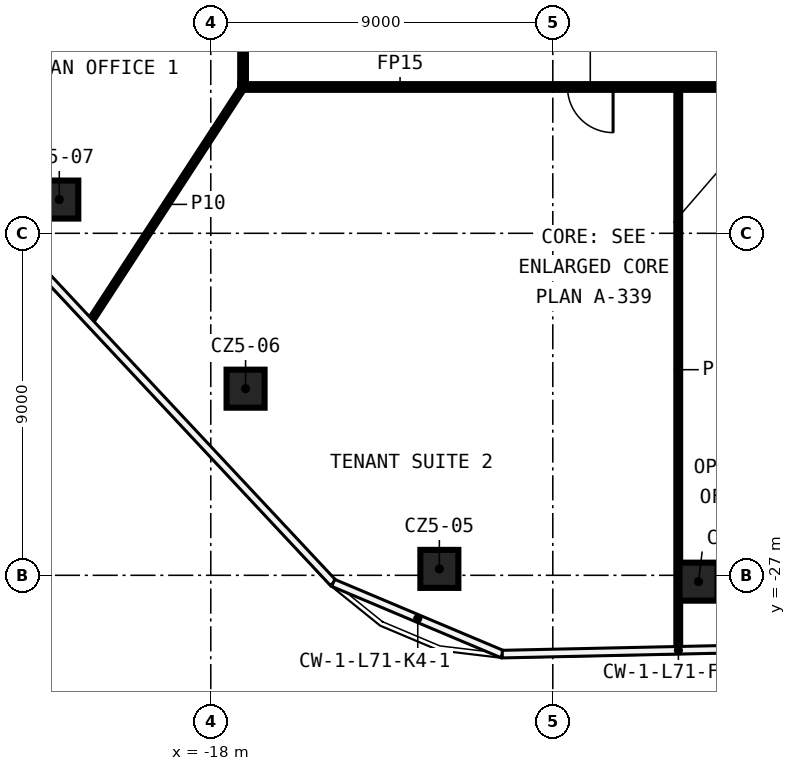
"""IFC4 building model, lengths in metres.
Left out: names, types, materials, properties, quantities, classifications, styles, units other than length and angle.
Written with IfcOpenShell. Run it as: python <this file> out.ifc"""

import sys

from ifc_helpers import new_model, si_unit, direction, frame, frame_2d, origin, origin_2d, place, context, subcontext, project, spatial, rectangle, extrude, element, fill, save


model = new_model("IFC4")
c1 = context("Model", 3, precision=1e-05, world=origin(), true_north=direction((0.0, 1.0)))
c2 = subcontext(c1, "Body", "Model", "MODEL_VIEW")
j1 = project(units=[si_unit("LENGTHUNIT", "METRE"), si_unit("PLANEANGLEUNIT", "RADIAN")], contexts=[c1])
p1 = place(None, origin())
s1 = spatial("IfcSite", under=j1, at=p1, CompositionType="ELEMENT")
p2 = place(p1, origin())
s2 = spatial("IfcBuilding", under=s1, at=p2, CompositionType="ELEMENT")
p3 = place(p2, frame((0.0, 0.0, 332.0)))
s3 = spatial("IfcBuildingStorey", under=s2, at=p3, CompositionType="ELEMENT", Elevation=332.0)
for number, where, z_axis, x_axis in (
    (1, (-5.166, -27.167, 0.0), (0.0, 0.0, 1.0), (1.0, 0.0, 0.0)),
    (2, (-11.985, -26.831, 0.0), (0.0, 0.0, 1.0), (1.0, 0.0, 0.0)),
    (3, (-17.084, -22.089, 0.0), (0.0, 0.0, 1.0), (1.0, 0.0, 0.0)),
    (4, (-21.986, -17.112, 0.0), (0.0, 0.0, 1.0), (1.0, 0.0, 0.0)),
):
    element("IfcColumn", number, at=place(p3, frame(where, z_axis=z_axis, x_axis=x_axis)), inside=s3, PredefinedType="COLUMN", context=c2, shape_type="SweptSolid", body=[
        extrude(rectangle(XDim=1.0, YDim=1.0, at=origin_2d()), origin(), (0.0, 0.0, 1.0), 3.82),
    ])
p4 = place(p3, frame((17.225, -14.15, 0.0), z_axis=(0.0, 0.0, 1.0), x_axis=(-1.0, 0.0, 0.0)))
e5 = element("IfcWall", 5, at=p4, inside=s3, PredefinedType="PARTITIONING", context=c2, shape_type="SweptSolid", body=[
    extrude(rectangle(XDim=34.45, YDim=0.15, at=frame_2d((17.225, 0.0))), origin(), (0.0, 0.0, 1.0), 3.82),
])
p5 = place(p4, frame((24.639, 0.0, 0.0)))
e6 = element("IfcOpeningElement", 6, at=p5, cuts=e5, PredefinedType="OPENING", context=c2, shape_type="SweptSolid", body=[
    extrude(rectangle(XDim=1.2, YDim=2.1, at=frame_2d((0.6, 1.05))), frame((0.0, 0.085, 0.0), z_axis=(0.0, -1.0, 0.0), x_axis=(1.0, 0.0, 0.0)), (0.0, 0.0, 1.0), 0.17),
])
p6 = place(p4, frame((20.005, 0.0, 0.0)))
e7 = element("IfcOpeningElement", 7, at=p6, cuts=e5, PredefinedType="OPENING", context=c2, shape_type="SweptSolid", body=[
    extrude(rectangle(XDim=1.2, YDim=2.1, at=frame_2d((0.6, 1.05))), frame((0.0, 0.085, 0.0), z_axis=(0.0, -1.0, 0.0), x_axis=(1.0, 0.0, 0.0)), (0.0, 0.0, 1.0), 0.17),
])
p7 = place(p4, frame((15.367, 0.0, 0.0)))
e8 = element("IfcOpeningElement", 8, at=p7, cuts=e5, PredefinedType="OPENING", context=c2, shape_type="SweptSolid", body=[
    extrude(rectangle(XDim=1.2, YDim=2.1, at=frame_2d((0.6, 1.05))), frame((0.0, 0.085, 0.0), z_axis=(0.0, -1.0, 0.0), x_axis=(1.0, 0.0, 0.0)), (0.0, 0.0, 1.0), 0.17),
])
p8 = place(p4, frame((10.73, 0.0, 0.0)))
e9 = element("IfcOpeningElement", 9, at=p8, cuts=e5, PredefinedType="OPENING", context=c2, shape_type="SweptSolid", body=[
    extrude(rectangle(XDim=1.2, YDim=2.1, at=frame_2d((0.6, 1.05))), frame((0.0, 0.085, 0.0), z_axis=(0.0, -1.0, 0.0), x_axis=(1.0, 0.0, 0.0)), (0.0, 0.0, 1.0), 0.17),
])
p9 = place(p4, frame((6.097, 0.0, 0.0)))
e10 = element("IfcOpeningElement", 10, at=p9, cuts=e5, PredefinedType="OPENING", context=c2, shape_type="SweptSolid", body=[
    extrude(rectangle(XDim=1.2, YDim=2.1, at=frame_2d((0.6, 1.05))), frame((0.0, 0.085, 0.0), z_axis=(0.0, -1.0, 0.0), x_axis=(1.0, 0.0, 0.0)), (0.0, 0.0, 1.0), 0.17),
])
p10 = place(p4, frame((1.83, 0.0, 0.0)))
e11 = element("IfcOpeningElement", 11, at=p10, cuts=e5, PredefinedType="OPENING", context=c2, shape_type="SweptSolid", body=[
    extrude(rectangle(XDim=1.2, YDim=2.1, at=frame_2d((0.6, 1.05))), frame((0.0, 0.085, 0.0), z_axis=(0.0, -1.0, 0.0), x_axis=(1.0, 0.0, 0.0)), (0.0, 0.0, 1.0), 0.17),
])
p11 = place(p3, frame((-21.176, -20.328, 0.0), z_axis=(0.0, 0.0, 1.0), x_axis=(0.5459597113, 0.837811430834, 0.0)))
e12 = element("IfcWall", 12, at=p11, inside=s3, PredefinedType="PARTITIONING", context=c2, shape_type="SweptSolid", body=[
    extrude(rectangle(XDim=7.374, YDim=0.1, at=frame_2d((3.687, 0.0))), origin(), (0.0, 0.0, 1.0), 3.82),
])
p12 = place(p3, frame((-5.699, -28.953, 0.0), z_axis=(0.0, 0.0, 1.0), x_axis=(0.0, 1.0, 0.0)))
e13 = element("IfcWall", 13, at=p12, inside=s3, PredefinedType="PARTITIONING", context=c2, shape_type="SweptSolid", body=[
    extrude(rectangle(XDim=14.728, YDim=0.1, at=frame_2d((7.364, 0.0))), origin(), (0.0, 0.0, 1.0), 3.82),
])
p13 = place(p3, frame((-17.15, -14.075, 0.0), z_axis=(0.0, 0.0, 1.0), x_axis=(0.0, 1.0, 0.0)))
e14 = element("IfcWall", 14, at=p13, inside=s3, PredefinedType="PARTITIONING", context=c2, shape_type="SweptSolid", body=[
    extrude(rectangle(XDim=28.15, YDim=0.15, at=frame_2d((14.075, 0.0))), origin(), (0.0, 0.0, 1.0), 3.82),
])
p14 = place(p13, frame((11.122, 0.0, 0.0)))
e15 = element("IfcOpeningElement", 15, at=p14, cuts=e14, PredefinedType="OPENING", context=c2, shape_type="SweptSolid", body=[
    extrude(rectangle(XDim=1.2, YDim=2.1, at=frame_2d((0.6, 1.05))), frame((0.0, 0.085, 0.0), z_axis=(0.0, -1.0, 0.0), x_axis=(1.0, 0.0, 0.0)), (0.0, 0.0, 1.0), 0.17),
])
p15 = place(p13, frame((5.555, 0.0, 0.0)))
e16 = element("IfcOpeningElement", 16, at=p15, cuts=e14, PredefinedType="OPENING", context=c2, shape_type="SweptSolid", body=[
    extrude(rectangle(XDim=1.2, YDim=2.1, at=frame_2d((0.6, 1.05))), frame((0.0, 0.085, 0.0), z_axis=(0.0, -1.0, 0.0), x_axis=(1.0, 0.0, 0.0)), (0.0, 0.0, 1.0), 0.17),
])
p16 = place(p13, frame((1.7, 0.0, 0.0)))
e17 = element("IfcOpeningElement", 17, at=p16, cuts=e14, PredefinedType="OPENING", context=c2, shape_type="SweptSolid", body=[
    extrude(rectangle(XDim=1.2, YDim=2.1, at=frame_2d((0.6, 1.05))), frame((0.0, 0.085, 0.0), z_axis=(0.0, -1.0, 0.0), x_axis=(1.0, 0.0, 0.0)), (0.0, 0.0, 1.0), 0.17),
])
p17 = place(p13, frame((24.457, 0.0, 0.0)))
e18 = element("IfcOpeningElement", 18, at=p17, cuts=e14, PredefinedType="OPENING", context=c2, shape_type="SweptSolid", body=[
    extrude(rectangle(XDim=1.2, YDim=2.1, at=frame_2d((0.6, 1.05))), frame((0.0, 0.085, 0.0), z_axis=(0.0, -1.0, 0.0), x_axis=(1.0, 0.0, 0.0)), (0.0, 0.0, 1.0), 0.17),
])
p18 = place(p13, frame((20.314, 0.0, 0.0)))
e19 = element("IfcOpeningElement", 19, at=p18, cuts=e14, PredefinedType="OPENING", context=c2, shape_type="SweptSolid", body=[
    extrude(rectangle(XDim=1.2, YDim=2.1, at=frame_2d((0.6, 1.05))), frame((0.0, 0.085, 0.0), z_axis=(0.0, -1.0, 0.0), x_axis=(1.0, 0.0, 0.0)), (0.0, 0.0, 1.0), 0.17),
])
p19 = place(p13, frame((16.172, 0.0, 0.0)))
e20 = element("IfcOpeningElement", 20, at=p19, cuts=e14, PredefinedType="OPENING", context=c2, shape_type="SweptSolid", body=[
    extrude(rectangle(XDim=1.2, YDim=2.1, at=frame_2d((0.6, 1.05))), frame((0.0, 0.085, 0.0), z_axis=(0.0, -1.0, 0.0), x_axis=(1.0, 0.0, 0.0)), (0.0, 0.0, 1.0), 0.17),
])
p20 = place(p5, origin())
e21 = element("IfcDoor", 21, at=p20, inside=s3, OperationType="SINGLE_SWING_LEFT", PredefinedType="DOOR", context=c2, shape_type="SweptSolid", body=[
    extrude(rectangle(XDim=1.2, YDim=2.1, at=frame_2d((0.6, 1.05))), frame((0.0, 0.025, 0.0), z_axis=(0.0, -1.0, 0.0), x_axis=(1.0, 0.0, 0.0)), (0.0, 0.0, 1.0), 0.05),
])
fill(e6, e21)
save(model, sys.argv[1])
